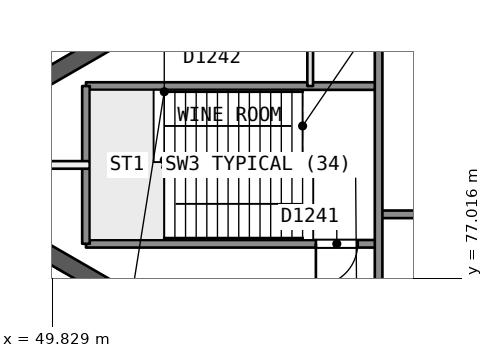
"""IFC4 building model, lengths in metres.
Left out: names, types, materials, properties, quantities, classifications, styles, units other than length and angle.
Written with IfcOpenShell. Run it as: python <this file> out.ifc"""

import sys

from ifc_helpers import new_model, si_unit, direction, frame, frame_2d, origin, place, context, subcontext, project, spatial, rectangle, extrude, element, fill, save


model = new_model("IFC4")
c1 = context("Model", 3, precision=1e-05, world=origin(), true_north=direction((0.0, 1.0)))
c2 = subcontext(c1, "Body", "Model", "MODEL_VIEW")
j1 = project(units=[si_unit("LENGTHUNIT", "METRE"), si_unit("PLANEANGLEUNIT", "RADIAN")], contexts=[c1])
p1 = place(None, origin())
s1 = spatial("IfcSite", under=j1, at=p1, CompositionType="ELEMENT")
p2 = place(p1, origin())
s2 = spatial("IfcBuilding", under=s1, at=p2, CompositionType="ELEMENT")
p3 = place(p2, frame((0.0, 0.0, 231.7)))
s3 = spatial("IfcBuildingStorey", under=s2, at=p3, CompositionType="ELEMENT", Elevation=231.7)
p4 = place(p3, frame((60.728, 88.682, 0.0), z_axis=(0.0, 0.0, 1.0), x_axis=(-0.866021613849, -0.500006564303, 0.0)))
e1 = element("IfcWall", 1, at=p4, inside=s3, PredefinedType="SHEAR", context=c2, shape_type="SweptSolid", body=[
    extrude(rectangle(XDim=14.108, YDim=0.45, at=frame_2d((7.054, 0.0))), origin(), (0.0, 0.0, 1.0), 3.7),
])
p5 = place(p3, frame((48.622, 78.307, 0.0), z_axis=(0.0, 0.0, 1.0), x_axis=(0.86602701116, -0.499997215934, 0.0)))
e2 = element("IfcWall", 2, at=p5, inside=s3, PredefinedType="SHEAR", context=c2, shape_type="SweptSolid", body=[
    extrude(rectangle(XDim=14.204, YDim=0.45, at=frame_2d((7.102, 0.0))), origin(), (0.0, 0.0, 1.0), 3.7),
])
p6 = place(p3, frame((44.584, 82.563, 0.0), z_axis=(0.0, 0.0, 1.0), x_axis=(0.866023992326, 0.500002444709, 0.0)))
e3 = element("IfcWall", 3, at=p6, inside=s3, PredefinedType="SOLIDWALL", context=c2, shape_type="SweptSolid", body=[
    extrude(rectangle(XDim=50.118, YDim=0.3, at=frame_2d((25.059, 0.0))), origin(), (0.0, 0.0, 1.0), 3.3),
])
p7 = place(p6, frame((23.391, 0.0, 0.0)))
e4 = element("IfcOpeningElement", 4, at=p7, cuts=e3, PredefinedType="OPENING", context=c2, shape_type="SweptSolid", body=[
    extrude(rectangle(XDim=2.4, YDim=2.4, at=frame_2d((1.2, 1.2))), frame((0.0, 0.161, 0.0), z_axis=(0.0, -1.0, 0.0), x_axis=(1.0, 0.0, 0.0)), (0.0, 0.0, 1.0), 0.321),
])
p8 = place(p6, frame((37.835, 0.0, 0.0)))
e5 = element("IfcOpeningElement", 5, at=p8, cuts=e3, PredefinedType="OPENING", context=c2, shape_type="SweptSolid", body=[
    extrude(rectangle(XDim=2.4, YDim=2.4, at=frame_2d((1.2, 1.2))), frame((0.0, 0.161, 0.0), z_axis=(0.0, -1.0, 0.0), x_axis=(1.0, 0.0, 0.0)), (0.0, 0.0, 1.0), 0.321),
])
p9 = place(p6, frame((9.416, 0.0, 0.0)))
e6 = element("IfcOpeningElement", 6, at=p9, cuts=e3, PredefinedType="OPENING", context=c2, shape_type="SweptSolid", body=[
    extrude(rectangle(XDim=2.4, YDim=2.4, at=frame_2d((1.2, 1.2))), frame((0.0, 0.161, 0.0), z_axis=(0.0, -1.0, 0.0), x_axis=(1.0, 0.0, 0.0)), (0.0, 0.0, 1.0), 0.321),
])
p10 = place(p3, frame((87.988, 52.377, 0.0), z_axis=(0.0, 0.0, 1.0), x_axis=(-0.866023992326, 0.500002444709, 0.0)))
e7 = element("IfcWall", 7, at=p10, inside=s3, PredefinedType="SOLIDWALL", context=c2, shape_type="SweptSolid", body=[
    extrude(rectangle(XDim=50.118, YDim=0.3, at=frame_2d((25.059, 0.0))), origin(), (0.0, 0.0, 1.0), 3.3),
])
p11 = place(p10, frame((24.015, 0.0, 0.0)))
e8 = element("IfcOpeningElement", 8, at=p11, cuts=e7, PredefinedType="OPENING", context=c2, shape_type="SweptSolid", body=[
    extrude(rectangle(XDim=2.4, YDim=2.4, at=frame_2d((1.2, 1.2))), frame((0.0, 0.161, 0.0), z_axis=(0.0, -1.0, 0.0), x_axis=(1.0, 0.0, 0.0)), (0.0, 0.0, 1.0), 0.321),
])
p12 = place(p10, frame((38.146, 0.0, 0.0)))
e9 = element("IfcOpeningElement", 9, at=p12, cuts=e7, PredefinedType="OPENING", context=c2, shape_type="SweptSolid", body=[
    extrude(rectangle(XDim=2.4, YDim=2.4, at=frame_2d((1.2, 1.2))), frame((0.0, 0.161, 0.0), z_axis=(0.0, -1.0, 0.0), x_axis=(1.0, 0.0, 0.0)), (0.0, 0.0, 1.0), 0.321),
])
p13 = place(p10, frame((9.727, 0.0, 0.0)))
e10 = element("IfcOpeningElement", 10, at=p13, cuts=e7, PredefinedType="OPENING", context=c2, shape_type="SweptSolid", body=[
    extrude(rectangle(XDim=2.4, YDim=2.4, at=frame_2d((1.2, 1.2))), frame((0.0, 0.161, 0.0), z_axis=(0.0, -1.0, 0.0), x_axis=(1.0, 0.0, 0.0)), (0.0, 0.0, 1.0), 0.321),
])
p14 = place(p3, frame((58.42, 82.075, 0.0), z_axis=(0.0, 0.0, 1.0), x_axis=(-1.0, 0.0, 0.0)))
e11 = element("IfcWall", 11, at=p14, inside=s3, PredefinedType="SOLIDWALL", context=c2, shape_type="SweptSolid", body=[
    extrude(rectangle(XDim=7.7, YDim=0.2, at=frame_2d((3.85, 0.0))), origin(), (0.0, 0.0, 1.0), 3.3),
])
p15 = place(p3, frame((50.82, 80.0, 0.0), z_axis=(0.0, 0.0, 1.0), x_axis=(-1.0, 0.0, 0.0)))
e12 = element("IfcWall", 12, at=p15, inside=s3, PredefinedType="PARTITIONING", context=c2, shape_type="SweptSolid", body=[
    extrude(rectangle(XDim=1.973, YDim=0.2, at=frame_2d((0.987, 0.0))), origin(), (0.0, 0.0, 1.0), 3.3),
])
p16 = place(p3, frame((60.9, 78.7, 0.0), z_axis=(0.0, 0.0, 1.0), x_axis=(-1.0, 0.0, 0.0)))
e13 = element("IfcWall", 13, at=p16, inside=s3, PredefinedType="SOLIDWALL", context=c2, shape_type="SweptSolid", body=[
    extrude(rectangle(XDim=2.48, YDim=0.2, at=frame_2d((1.24, 0.0))), origin(), (0.0, 0.0, 1.0), 3.3),
])
p17 = place(p3, frame((58.42, 77.925, 0.0), z_axis=(0.0, 0.0, 1.0), x_axis=(-1.0, 0.0, 0.0)))
e14 = element("IfcWall", 14, at=p17, inside=s3, PredefinedType="SOLIDWALL", context=c2, shape_type="SweptSolid", body=[
    extrude(rectangle(XDim=7.7, YDim=0.2, at=frame_2d((3.85, 0.0))), origin(), (0.0, 0.0, 1.0), 3.3),
])
p18 = place(p17, frame((0.55, 0.0, 0.0)))
e15 = element("IfcOpeningElement", 15, at=p18, cuts=e14, PredefinedType="OPENING", context=c2, shape_type="SweptSolid", body=[
    extrude(rectangle(XDim=1.1, YDim=2.1, at=frame_2d((0.55, 1.05))), frame((0.0, 0.11, 0.0), z_axis=(0.0, -1.0, 0.0), x_axis=(1.0, 0.0, 0.0)), (0.0, 0.0, 1.0), 0.221),
])
p19 = place(p3, frame((58.42, 87.09, 0.0), z_axis=(0.0, 0.0, 1.0), x_axis=(0.0, -1.0, 0.0)))
e16 = element("IfcWall", 16, at=p19, inside=s3, PredefinedType="SOLIDWALL", context=c2, shape_type="SweptSolid", body=[
    extrude(rectangle(XDim=10.64, YDim=0.2, at=frame_2d((5.32, 0.0))), origin(), (0.0, 0.0, 1.0), 3.3),
])
p20 = place(p19, frame((0.37, 0.0, 0.0)))
e17 = element("IfcOpeningElement", 17, at=p20, cuts=e16, PredefinedType="OPENING", context=c2, shape_type="SweptSolid", body=[
    extrude(rectangle(XDim=0.9, YDim=2.1, at=frame_2d((0.45, 1.05))), frame((0.0, 0.11, 0.0), z_axis=(0.0, -1.0, 0.0), x_axis=(1.0, 0.0, 0.0)), (0.0, 0.0, 1.0), 0.221),
])
p21 = place(p3, frame((56.62, 86.051, 0.0), z_axis=(0.0, 0.0, 1.0), x_axis=(0.0, -1.0, 0.0)))
e18 = element("IfcWall", 18, at=p21, inside=s3, PredefinedType="PARTITIONING", context=c2, shape_type="SweptSolid", body=[
    extrude(rectangle(XDim=3.976, YDim=0.15, at=frame_2d((1.988, 0.0))), origin(), (0.0, 0.0, 1.0), 3.3),
])
p22 = place(p21, frame((1.538, 0.0, 0.0)))
e19 = element("IfcOpeningElement", 19, at=p22, cuts=e18, PredefinedType="OPENING", context=c2, shape_type="SweptSolid", body=[
    extrude(rectangle(XDim=0.9, YDim=2.1, at=frame_2d((0.45, 1.05))), frame((0.0, 0.085, 0.0), z_axis=(0.0, -1.0, 0.0), x_axis=(1.0, 0.0, 0.0)), (0.0, 0.0, 1.0), 0.171),
])
p23 = place(p3, frame((50.72, 82.075, 0.0), z_axis=(0.0, 0.0, 1.0), x_axis=(0.0, -1.0, 0.0)))
e20 = element("IfcWall", 20, at=p23, inside=s3, PredefinedType="SOLIDWALL", context=c2, shape_type="SweptSolid", body=[
    extrude(rectangle(XDim=4.15, YDim=0.2, at=frame_2d((2.075, 0.0))), origin(), (0.0, 0.0, 1.0), 3.3),
])
p24 = place(p18, origin())
e21 = element("IfcDoor", 21, at=p24, inside=s3, OperationType="SINGLE_SWING_RIGHT", PredefinedType="NOTDEFINED", context=c2, shape_type="SweptSolid", body=[
    extrude(rectangle(XDim=1.1, YDim=2.1, at=frame_2d((0.55, 1.05))), frame((0.0, 0.025, 0.0), z_axis=(0.0, -1.0, 0.0), x_axis=(1.0, 0.0, 0.0)), (0.0, 0.0, 1.0), 0.05),
])
fill(e15, e21)
save(model, sys.argv[1])
